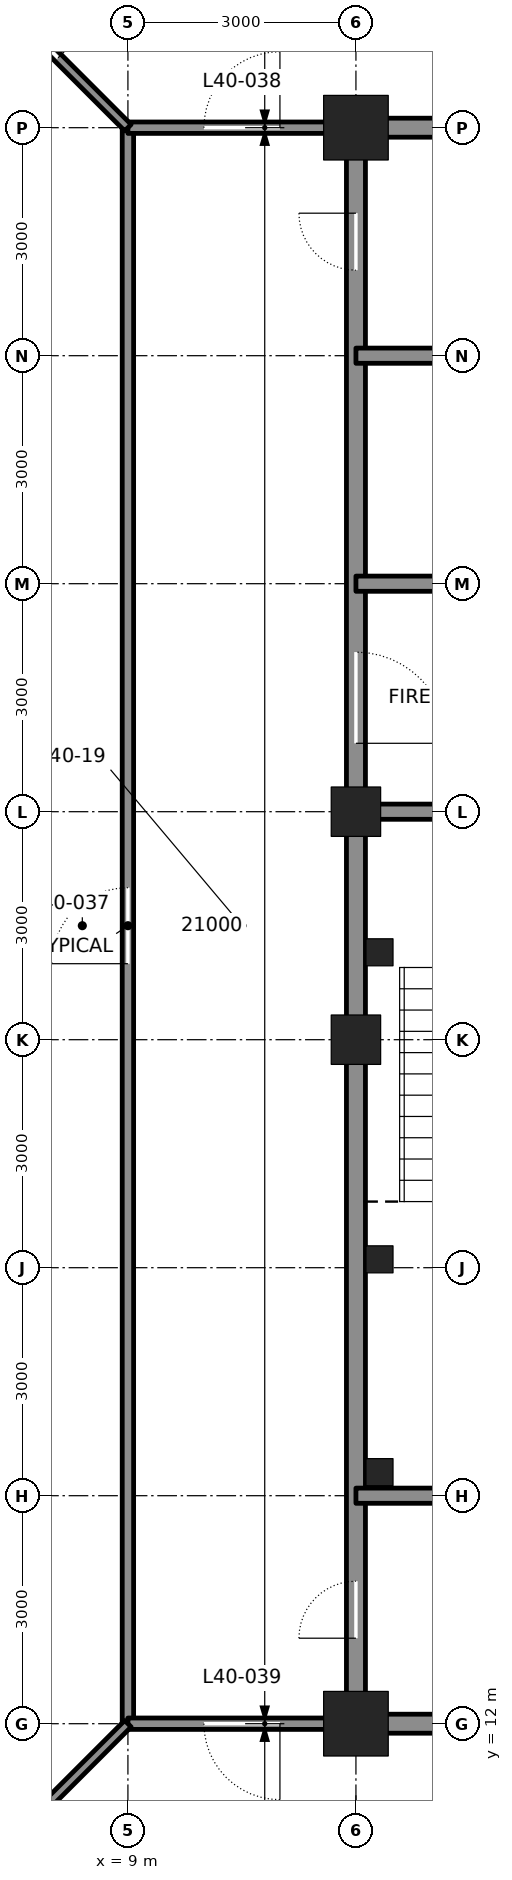
"""IFC4 building model, lengths in metres.
Left out: names, types, materials, properties, quantities, classifications, styles, units other than length and angle.
Written with IfcOpenShell. Run it as: python <this file> out.ifc"""

import sys

from ifc_helpers import new_model, si_unit, direction, frame, frame_2d, origin, origin_2d, place, context, subcontext, project, spatial, rectangle, hollow_rectangle, extrude, element, fill, save


model = new_model("IFC4")
c1 = context("Model", 3, precision=1e-05, world=origin(), true_north=direction((0.0, 1.0)))
c2 = subcontext(c1, "Body", "Model", "MODEL_VIEW")
j1 = project(units=[si_unit("LENGTHUNIT", "METRE"), si_unit("PLANEANGLEUNIT", "RADIAN")], contexts=[c1])
p1 = place(None, origin())
s1 = spatial("IfcSite", under=j1, at=p1, CompositionType="ELEMENT")
p2 = place(p1, origin())
s2 = spatial("IfcBuilding", under=s1, at=p2, CompositionType="ELEMENT")
p3 = place(p2, frame((0.0, 0.0, 184.5)))
s3 = spatial("IfcBuildingStorey", under=s2, at=p3, CompositionType="ELEMENT", Elevation=184.5)
for number, where, z_axis, x_axis in (
    (1, (12.0, 12.0, 0.0), (0.0, 0.0, 1.0), (1.0, 0.0, 0.0)),
    (2, (12.0, 33.0, 0.0), (0.0, 0.0, 1.0), (1.0, 0.0, 0.0)),
):
    element("IfcColumn", number, at=place(p3, frame(where, z_axis=z_axis, x_axis=x_axis)), inside=s3, PredefinedType="COLUMN", context=c2, shape_type="SweptSolid", body=[
        extrude(hollow_rectangle(XDim=0.85, YDim=0.85, WallThickness=0.085, at=origin_2d()), origin(), (0.0, 0.0, 1.0), 4.2),
    ])
for number, where, z_axis, x_axis in (
    (3, (12.0, 21.0, 0.0), (0.0, 0.0, 1.0), (1.0, 0.0, 0.0)),
    (4, (12.0, 24.0, 0.0), (0.0, 0.0, 1.0), (1.0, 0.0, 0.0)),
):
    element("IfcColumn", number, at=place(p3, frame(where, z_axis=z_axis, x_axis=x_axis)), inside=s3, PredefinedType="COLUMN", context=c2, shape_type="SweptSolid", body=[
        extrude(hollow_rectangle(XDim=0.65, YDim=0.65, WallThickness=0.065, at=origin_2d()), origin(), (0.0, 0.0, 1.0), 4.2),
    ])
p4 = place(p3, frame((12.0, 12.25, 0.0), z_axis=(0.0, 0.0, 1.0), x_axis=(0.0, 1.0, 0.0)))
e5 = element("IfcWall", 5, at=p4, inside=s3, PredefinedType="SOLIDWALL", context=c2, shape_type="SweptSolid", body=[
    extrude(rectangle(XDim=8.5, YDim=0.25, at=frame_2d((4.25, 0.0))), origin(), (0.0, 0.0, 1.0), 3.113),
])
p5 = place(p4, frame((0.875, 0.0, 0.0)))
e6 = element("IfcOpeningElement", 6, at=p5, cuts=e5, PredefinedType="OPENING", context=c2, shape_type="SweptSolid", body=[
    extrude(rectangle(XDim=0.75, YDim=2.1, at=frame_2d((0.375, 1.05))), frame((0.0, 0.135, 0.0), z_axis=(0.0, -1.0, 0.0), x_axis=(1.0, 0.0, 0.0)), (0.0, 0.0, 1.0), 0.27),
])
p6 = place(p3, frame((12.0, 21.25, 0.0), z_axis=(0.0, 0.0, 1.0), x_axis=(0.0, 1.0, 0.0)))
e7 = element("IfcWall", 7, at=p6, inside=s3, PredefinedType="SOLIDWALL", context=c2, shape_type="SweptSolid", body=[
    extrude(rectangle(XDim=2.5, YDim=0.25, at=frame_2d((1.25, 0.0))), origin(), (0.0, 0.0, 1.0), 3.113),
])
p7 = place(p3, frame((12.0, 24.25, 0.0), z_axis=(0.0, 0.0, 1.0), x_axis=(0.0, 1.0, 0.0)))
e8 = element("IfcWall", 8, at=p7, inside=s3, PredefinedType="SOLIDWALL", context=c2, shape_type="SweptSolid", body=[
    extrude(rectangle(XDim=8.5, YDim=0.25, at=frame_2d((4.25, 0.0))), origin(), (0.0, 0.0, 1.0), 3.113),
])
p8 = place(p7, frame((0.65, 0.0, 0.0)))
e9 = element("IfcOpeningElement", 9, at=p8, cuts=e8, PredefinedType="OPENING", context=c2, shape_type="SweptSolid", body=[
    extrude(rectangle(XDim=1.2, YDim=2.1, at=frame_2d((0.6, 1.05))), frame((0.0, 0.135, 0.0), z_axis=(0.0, -1.0, 0.0), x_axis=(1.0, 0.0, 0.0)), (0.0, 0.0, 1.0), 0.27),
])
p9 = place(p7, frame((6.875, 0.0, 0.0)))
e10 = element("IfcOpeningElement", 10, at=p9, cuts=e8, PredefinedType="OPENING", context=c2, shape_type="SweptSolid", body=[
    extrude(rectangle(XDim=0.75, YDim=2.1, at=frame_2d((0.375, 1.05))), frame((0.0, 0.135, 0.0), z_axis=(0.0, -1.0, 0.0), x_axis=(1.0, 0.0, 0.0)), (0.0, 0.0, 1.0), 0.27),
])
p10 = place(p3, frame((12.25, 12.0, 0.0), z_axis=(0.0, 0.0, 1.0), x_axis=(1.0, 0.0, 0.0)))
e11 = element("IfcWall", 11, at=p10, inside=s3, PredefinedType="SOLIDWALL", context=c2, shape_type="SweptSolid", body=[
    extrude(rectangle(XDim=4.0, YDim=0.25, at=frame_2d((2.0, 0.0))), origin(), (0.0, 0.0, 1.0), 3.181),
])
p11 = place(p3, frame((12.0, 15.0, 0.0), z_axis=(0.0, 0.0, 1.0), x_axis=(1.0, 0.0, 0.0)))
e12 = element("IfcWall", 12, at=p11, inside=s3, PredefinedType="SOLIDWALL", context=c2, shape_type="SweptSolid", body=[
    extrude(rectangle(XDim=7.5, YDim=0.2, at=frame_2d((3.75, 0.0))), origin(), (0.0, 0.0, 1.0), 4.04),
])
p12 = place(p3, frame((12.25, 24.0, 0.0), z_axis=(0.0, 0.0, 1.0), x_axis=(1.0, 0.0, 0.0)))
e13 = element("IfcWall", 13, at=p12, inside=s3, PredefinedType="SOLIDWALL", context=c2, shape_type="SweptSolid", body=[
    extrude(rectangle(XDim=4.0, YDim=0.2, at=frame_2d((2.0, 0.0))), origin(), (0.0, 0.0, 1.0), 3.09),
])
p13 = place(p12, frame((1.4, 0.0, 0.0)))
e14 = element("IfcOpeningElement", 14, at=p13, cuts=e13, PredefinedType="OPENING", context=c2, shape_type="SweptSolid", body=[
    extrude(rectangle(XDim=1.2, YDim=2.1, at=frame_2d((0.6, 1.05))), frame((0.0, 0.11, 0.0), z_axis=(0.0, -1.0, 0.0), x_axis=(1.0, 0.0, 0.0)), (0.0, 0.0, 1.0), 0.22),
])
p14 = place(p3, frame((12.0, 27.0, 0.0), z_axis=(0.0, 0.0, 1.0), x_axis=(1.0, 0.0, 0.0)))
e15 = element("IfcWall", 15, at=p14, inside=s3, PredefinedType="SOLIDWALL", context=c2, shape_type="SweptSolid", body=[
    extrude(rectangle(XDim=7.5, YDim=0.2, at=frame_2d((3.75, 0.0))), origin(), (0.0, 0.0, 1.0), 4.04),
])
p15 = place(p14, frame((1.65, 0.0, 0.0)))
e16 = element("IfcOpeningElement", 16, at=p15, cuts=e15, PredefinedType="OPENING", context=c2, shape_type="SweptSolid", body=[
    extrude(rectangle(XDim=1.2, YDim=2.1, at=frame_2d((0.6, 1.05))), frame((0.0, 0.11, 0.0), z_axis=(0.0, -1.0, 0.0), x_axis=(1.0, 0.0, 0.0)), (0.0, 0.0, 1.0), 0.22),
])
p16 = place(p3, frame((12.0, 30.0, 0.0), z_axis=(0.0, 0.0, 1.0), x_axis=(1.0, 0.0, 0.0)))
e17 = element("IfcWall", 17, at=p16, inside=s3, PredefinedType="SOLIDWALL", context=c2, shape_type="SweptSolid", body=[
    extrude(rectangle(XDim=4.5, YDim=0.2, at=frame_2d((2.25, 0.0))), origin(), (0.0, 0.0, 1.0), 4.04),
])
p17 = place(p3, frame((12.25, 33.0, 0.0), z_axis=(0.0, 0.0, 1.0), x_axis=(1.0, 0.0, 0.0)))
e18 = element("IfcWall", 18, at=p17, inside=s3, PredefinedType="SOLIDWALL", context=c2, shape_type="SweptSolid", body=[
    extrude(rectangle(XDim=4.0, YDim=0.25, at=frame_2d((2.0, 0.0))), origin(), (0.0, 0.0, 1.0), 3.181),
])
p18 = place(p3, frame((9.0, 12.0, 0.0), z_axis=(0.0, 0.0, 1.0), x_axis=(0.0, 1.0, 0.0)))
e19 = element("IfcWall", 19, at=p18, inside=s3, PredefinedType="PARTITIONING", context=c2, shape_type="SweptSolid", body=[
    extrude(rectangle(XDim=21.0, YDim=0.15, at=frame_2d((10.5, 0.0))), origin(), (0.0, 0.0, 1.0), 4.04),
])
p19 = place(p18, frame((10.0, 0.0, 0.0)))
e20 = element("IfcOpeningElement", 20, at=p19, cuts=e19, PredefinedType="OPENING", context=c2, shape_type="SweptSolid", body=[
    extrude(rectangle(XDim=1.0, YDim=2.4, at=frame_2d((0.5, 1.2))), frame((0.0, 0.085, 0.0), z_axis=(0.0, -1.0, 0.0), x_axis=(1.0, 0.0, 0.0)), (0.0, 0.0, 1.0), 0.17),
])
p20 = place(p3, frame((9.0, 33.0, 0.0), z_axis=(0.0, 0.0, 1.0), x_axis=(1.0, 0.0, 0.0)))
e21 = element("IfcWall", 21, at=p20, inside=s3, PredefinedType="PARTITIONING", context=c2, shape_type="SweptSolid", body=[
    extrude(rectangle(XDim=3.0, YDim=0.15, at=frame_2d((1.5, 0.0))), origin(), (0.0, 0.0, 1.0), 3.271),
])
p21 = place(p20, frame((1.0, 0.0, 0.0)))
e22 = element("IfcOpeningElement", 22, at=p21, cuts=e21, PredefinedType="OPENING", context=c2, shape_type="SweptSolid", body=[
    extrude(rectangle(XDim=1.0, YDim=2.4, at=frame_2d((0.5, 1.2))), frame((0.0, 0.085, 0.0), z_axis=(0.0, -1.0, 0.0), x_axis=(1.0, 0.0, 0.0)), (0.0, 0.0, 1.0), 0.17),
])
p22 = place(p3, frame((9.0, 12.0, 0.0), z_axis=(0.0, 0.0, 1.0), x_axis=(1.0, 0.0, 0.0)))
e23 = element("IfcWall", 23, at=p22, inside=s3, PredefinedType="PARTITIONING", context=c2, shape_type="SweptSolid", body=[
    extrude(rectangle(XDim=3.0, YDim=0.15, at=frame_2d((1.5, 0.0))), origin(), (0.0, 0.0, 1.0), 3.271),
])
p23 = place(p22, frame((1.0, 0.0, 0.0)))
e24 = element("IfcOpeningElement", 24, at=p23, cuts=e23, PredefinedType="OPENING", context=c2, shape_type="SweptSolid", body=[
    extrude(rectangle(XDim=1.0, YDim=2.4, at=frame_2d((0.5, 1.2))), frame((0.0, 0.085, 0.0), z_axis=(0.0, -1.0, 0.0), x_axis=(1.0, 0.0, 0.0)), (0.0, 0.0, 1.0), 0.17),
])
p24 = place(p3, frame((9.0, 33.0, 0.0), z_axis=(0.0, 0.0, 1.0), x_axis=(-0.707106781187, 0.707106781187, 0.0)))
e25 = element("IfcWall", 25, at=p24, inside=s3, PredefinedType="PARTITIONING", context=c2, shape_type="SweptSolid", body=[
    extrude(rectangle(XDim=5.732, YDim=0.12, at=frame_2d((2.866, 0.0))), origin(), (0.0, 0.0, 1.0), 4.04),
])
p25 = place(p24, frame((1.3, 0.0, 0.0)))
e26 = element("IfcOpeningElement", 26, at=p25, cuts=e25, PredefinedType="OPENING", context=c2, shape_type="SweptSolid", body=[
    extrude(rectangle(XDim=1.0, YDim=2.4, at=frame_2d((0.5, 1.2))), frame((0.0, 0.07, 0.0), z_axis=(0.0, -1.0, 0.0), x_axis=(1.0, 0.0, 0.0)), (0.0, 0.0, 1.0), 0.14),
])
p26 = place(p3, frame((9.0, 12.0, 0.0), z_axis=(0.0, 0.0, 1.0), x_axis=(-0.707106781187, -0.707106781187, 0.0)))
e27 = element("IfcWall", 27, at=p26, inside=s3, PredefinedType="PARTITIONING", context=c2, shape_type="SweptSolid", body=[
    extrude(rectangle(XDim=1.489, YDim=0.12, at=frame_2d((0.745, 0.0))), origin(), (0.0, 0.0, 1.0), 4.04),
])
for number, where, z_axis, x_axis in (
    (28, (12.31, 15.31, 0.0), (0.0, 0.0, 1.0), (1.0, 0.0, 0.0)),
    (29, (12.31, 18.11, 0.0), (0.0, 0.0, 1.0), (1.0, 0.0, 0.0)),
    (30, (12.31, 22.15, 0.0), (0.0, 0.0, 1.0), (1.0, 0.0, 0.0)),
):
    element("IfcColumn", number, at=place(p3, frame(where, z_axis=z_axis, x_axis=x_axis)), inside=s3, PredefinedType="COLUMN", context=c2, shape_type="SweptSolid", body=[
        extrude(hollow_rectangle(XDim=0.356, YDim=0.356, WallThickness=0.015, at=origin_2d()), origin(), (0.0, 0.0, 1.0), 4.2),
    ])
p27 = place(p8, frame((1.2, 0.0, 0.0), z_axis=(0.0, 0.0, 1.0), x_axis=(-1.0, 0.0, 0.0)))
e31 = element("IfcDoor", 31, at=p27, inside=s3, OperationType="SINGLE_SWING_RIGHT", PredefinedType="DOOR", context=c2, shape_type="SweptSolid", body=[
    extrude(rectangle(XDim=1.2, YDim=2.1, at=frame_2d((0.6, 1.05))), frame((0.0, 0.025, 0.0), z_axis=(0.0, -1.0, 0.0), x_axis=(1.0, 0.0, 0.0)), (0.0, 0.0, 1.0), 0.05),
])
fill(e9, e31)
p28 = place(p5, origin())
e32 = element("IfcDoor", 32, at=p28, inside=s3, OperationType="SINGLE_SWING_LEFT", PredefinedType="DOOR", context=c2, shape_type="SweptSolid", body=[
    extrude(rectangle(XDim=0.75, YDim=2.1, at=frame_2d((0.375, 1.05))), frame((0.0, 0.025, 0.0), z_axis=(0.0, -1.0, 0.0), x_axis=(1.0, 0.0, 0.0)), (0.0, 0.0, 1.0), 0.05),
])
fill(e6, e32)
p29 = place(p9, origin())
e33 = element("IfcDoor", 33, at=p29, inside=s3, OperationType="SINGLE_SWING_RIGHT", PredefinedType="DOOR", context=c2, shape_type="SweptSolid", body=[
    extrude(rectangle(XDim=0.75, YDim=2.1, at=frame_2d((0.375, 1.05))), frame((0.0, 0.025, 0.0), z_axis=(0.0, -1.0, 0.0), x_axis=(1.0, 0.0, 0.0)), (0.0, 0.0, 1.0), 0.05),
])
fill(e10, e33)
p30 = place(p19, origin())
e34 = element("IfcDoor", 34, at=p30, inside=s3, OperationType="SINGLE_SWING_LEFT", PredefinedType="DOOR", context=c2, shape_type="SweptSolid", body=[
    extrude(rectangle(XDim=1.0, YDim=2.4, at=frame_2d((0.5, 1.2))), frame((0.0, 0.025, 0.0), z_axis=(0.0, -1.0, 0.0), x_axis=(1.0, 0.0, 0.0)), (0.0, 0.0, 1.0), 0.05),
])
fill(e20, e34)
p31 = place(p21, origin())
e35 = element("IfcDoor", 35, at=p31, inside=s3, OperationType="SINGLE_SWING_RIGHT", PredefinedType="DOOR", context=c2, shape_type="SweptSolid", body=[
    extrude(rectangle(XDim=1.0, YDim=2.4, at=frame_2d((0.5, 1.2))), frame((0.0, 0.025, 0.0), z_axis=(0.0, -1.0, 0.0), x_axis=(1.0, 0.0, 0.0)), (0.0, 0.0, 1.0), 0.05),
])
fill(e22, e35)
p32 = place(p23, frame((1.0, 0.0, 0.0), z_axis=(0.0, 0.0, 1.0), x_axis=(-1.0, 0.0, 0.0)))
e36 = element("IfcDoor", 36, at=p32, inside=s3, OperationType="SINGLE_SWING_LEFT", PredefinedType="DOOR", context=c2, shape_type="SweptSolid", body=[
    extrude(rectangle(XDim=1.0, YDim=2.4, at=frame_2d((0.5, 1.2))), frame((0.0, 0.025, 0.0), z_axis=(0.0, -1.0, 0.0), x_axis=(1.0, 0.0, 0.0)), (0.0, 0.0, 1.0), 0.05),
])
fill(e24, e36)
p33 = place(p25, frame((1.0, 0.0, 0.0), z_axis=(0.0, 0.0, 1.0), x_axis=(-1.0, 0.0, 0.0)))
e37 = element("IfcDoor", 37, at=p33, inside=s3, OperationType="SINGLE_SWING_RIGHT", PredefinedType="DOOR", context=c2, shape_type="SweptSolid", body=[
    extrude(rectangle(XDim=1.0, YDim=2.4, at=frame_2d((0.5, 1.2))), frame((0.0, 0.025, 0.0), z_axis=(0.0, -1.0, 0.0), x_axis=(1.0, 0.0, 0.0)), (0.0, 0.0, 1.0), 0.05),
])
fill(e26, e37)
save(model, sys.argv[1])
